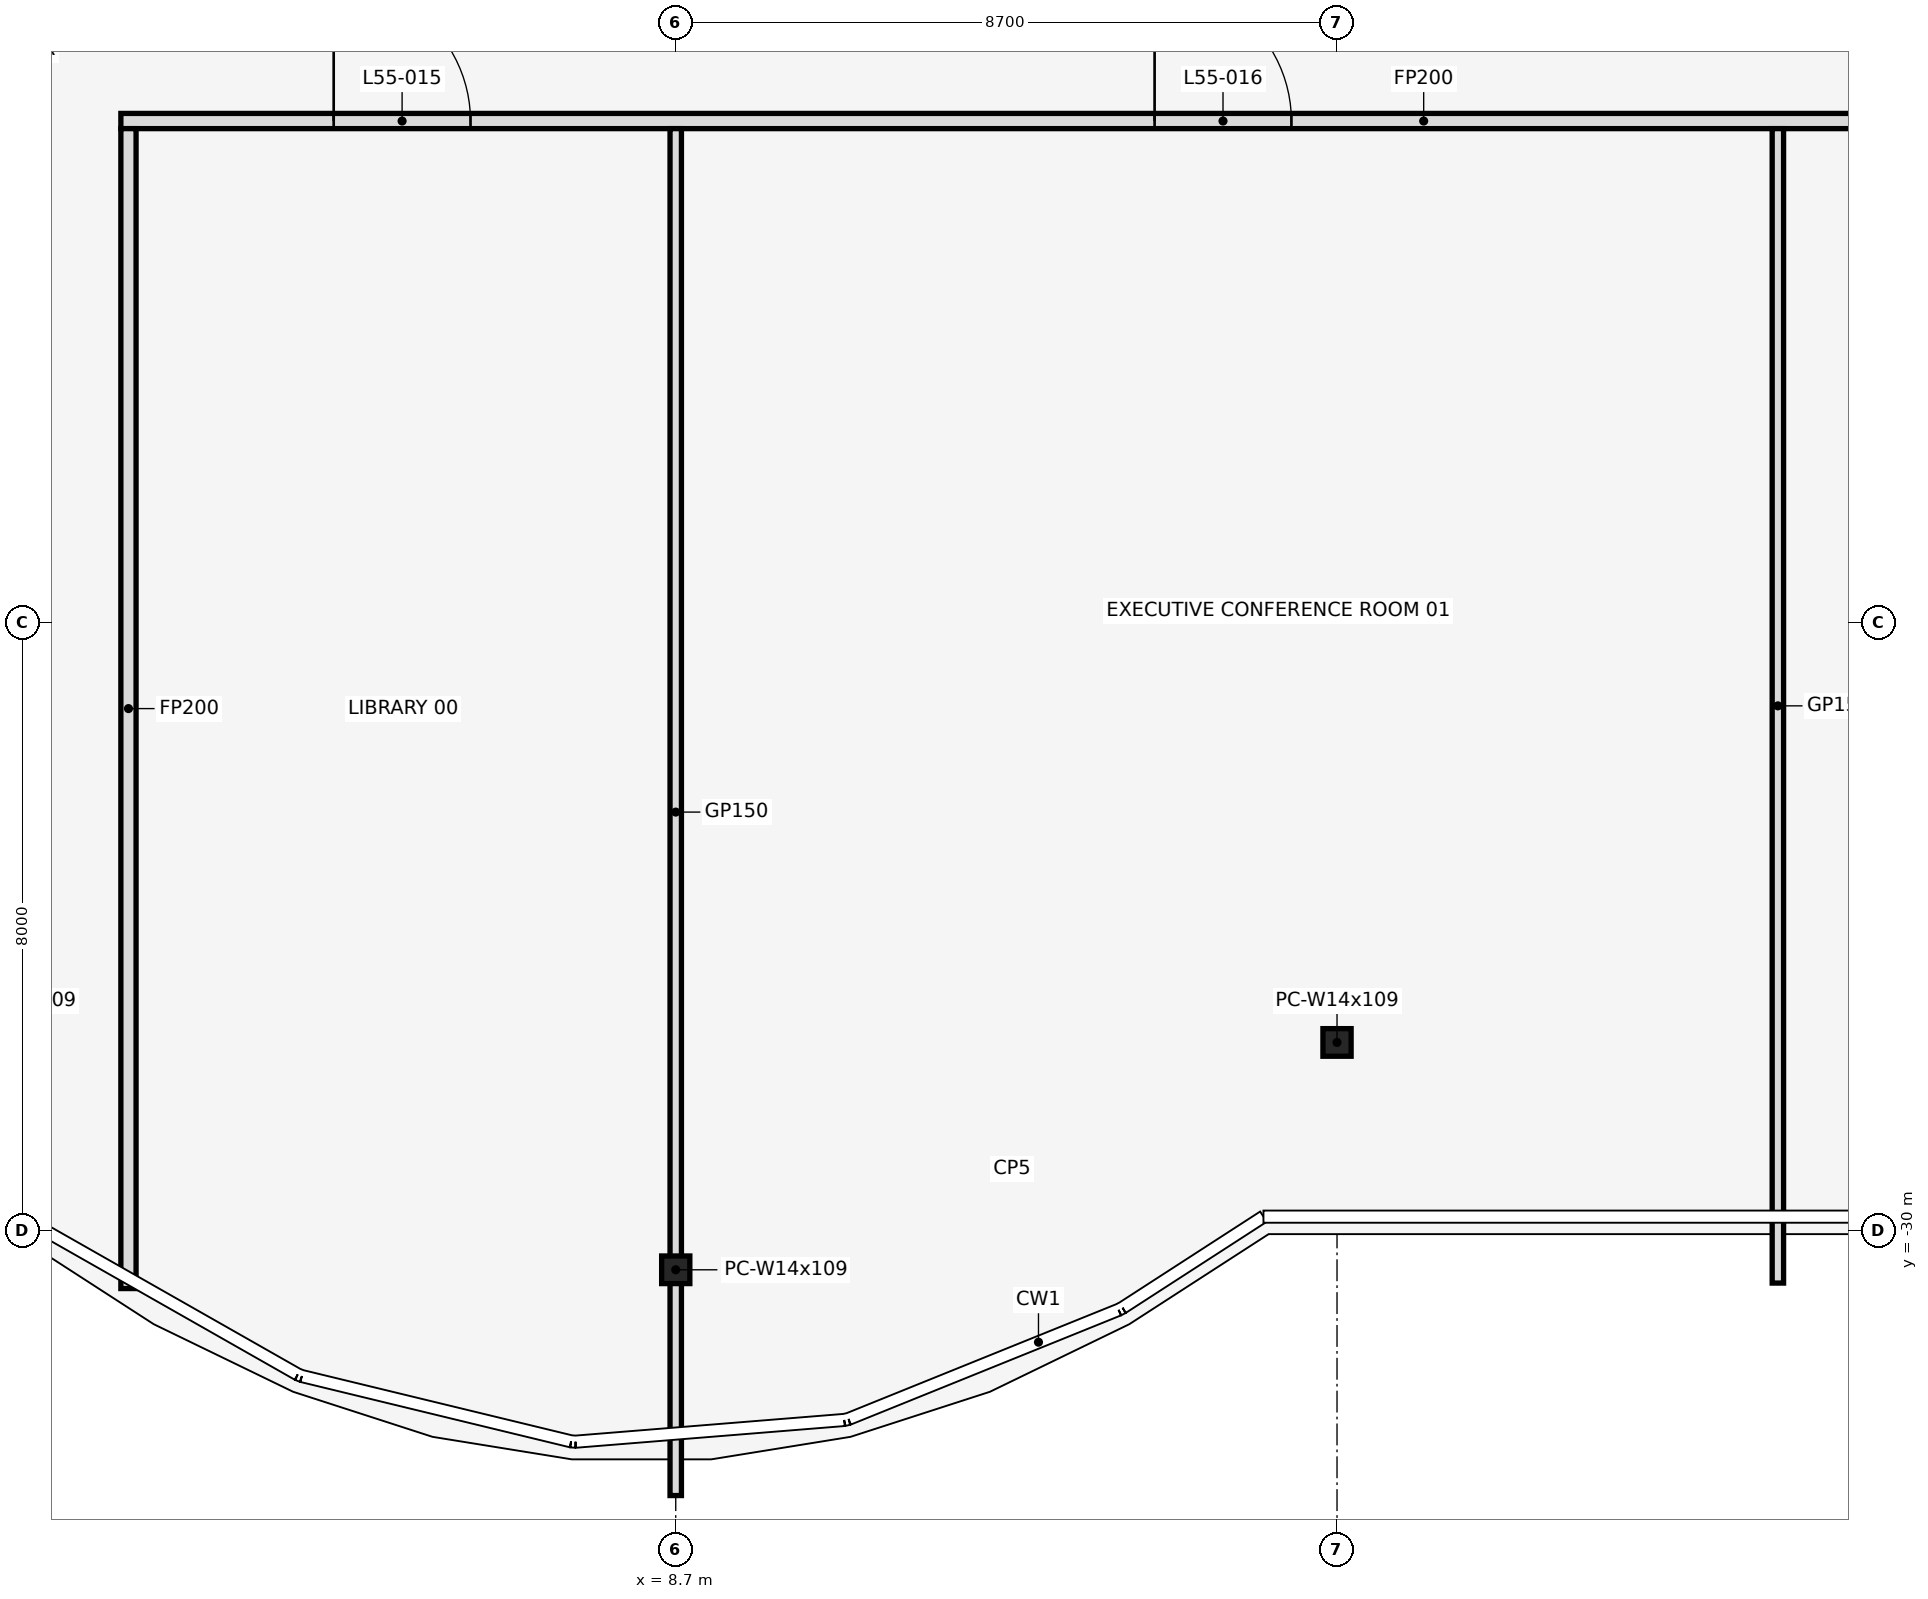
"""IFC4 building model, lengths in metres.
Left out: names, types, materials, properties, quantities, classifications, styles, units other than length and angle.
Written with IfcOpenShell. Run it as: python <this file> out.ifc"""

import sys

from ifc_helpers import new_model, si_unit, direction, frame, frame_2d, origin, origin_2d, place, context, subcontext, project, spatial, rectangle, i_section, extrude, element, fill, save


model = new_model("IFC4")
c1 = context("Model", 3, precision=1e-05, world=origin(), true_north=direction((0.0, 1.0)))
c2 = subcontext(c1, "Body", "Model", "MODEL_VIEW")
j1 = project(units=[si_unit("LENGTHUNIT", "METRE"), si_unit("PLANEANGLEUNIT", "RADIAN")], contexts=[c1])
p1 = place(None, origin())
s1 = spatial("IfcSite", under=j1, at=p1, CompositionType="ELEMENT")
p2 = place(p1, origin())
s2 = spatial("IfcBuilding", under=s1, at=p2, CompositionType="ELEMENT")
p3 = place(p2, frame((0.0, 0.0, 245.6)))
s3 = spatial("IfcBuildingStorey", under=s2, at=p3, CompositionType="ELEMENT", Elevation=245.6)
for number, where, z_axis, x_axis in (
    (1, (8.7, -30.513, 0.0), (0.0, 0.0, 1.0), (1.0, 0.0, 0.0)),
    (2, (17.4, -27.522, 0.0), (0.0, 0.0, 1.0), (1.0, 0.0, 0.0)),
):
    element("IfcColumn", number, at=place(p3, frame(where, z_axis=z_axis, x_axis=x_axis)), inside=s3, PredefinedType="COLUMN", context=c2, shape_type="SweptSolid", body=[
        extrude(i_section(OverallWidth=0.371, OverallDepth=0.363, WebThickness=0.013, FlangeThickness=0.022, at=origin_2d()), origin(), (0.0, 0.0, 1.0), 4.2),
    ])
p4 = place(p3, frame((1.4, -15.4, 0.0), z_axis=(0.0, 0.0, 1.0), x_axis=(1.0, 0.0, 0.0)))
e3 = element("IfcWall", 3, at=p4, inside=s3, PredefinedType="PARTITIONING", context=c2, shape_type="SweptSolid", body=[
    extrude(rectangle(XDim=34.28, YDim=0.2, at=frame_2d((17.14, 0.0))), origin(), (0.0, 0.0, 1.0), 3.039),
])
p5 = place(p4, frame((2.8, 0.0, 0.0)))
e4 = element("IfcOpeningElement", 4, at=p5, cuts=e3, PredefinedType="OPENING", context=c2, shape_type="SweptSolid", body=[
    extrude(rectangle(XDim=1.8, YDim=2.1, at=frame_2d((0.9, 1.05))), frame((0.0, 0.112, 0.0), z_axis=(0.0, -1.0, 0.0), x_axis=(1.0, 0.0, 0.0)), (0.0, 0.0, 1.0), 0.224),
])
p6 = place(p4, frame((13.6, 0.0, 0.0)))
e5 = element("IfcOpeningElement", 5, at=p6, cuts=e3, PredefinedType="OPENING", context=c2, shape_type="SweptSolid", body=[
    extrude(rectangle(XDim=1.8, YDim=2.1, at=frame_2d((0.9, 1.05))), frame((0.0, 0.112, 0.0), z_axis=(0.0, -1.0, 0.0), x_axis=(1.0, 0.0, 0.0)), (0.0, 0.0, 1.0), 0.224),
])
p7 = place(p4, frame((27.1, 0.0, 0.0)))
e6 = element("IfcOpeningElement", 6, at=p7, cuts=e3, PredefinedType="OPENING", context=c2, shape_type="SweptSolid", body=[
    extrude(rectangle(XDim=1.8, YDim=2.1, at=frame_2d((0.9, 1.05))), frame((0.0, 0.112, 0.0), z_axis=(0.0, -1.0, 0.0), x_axis=(1.0, 0.0, 0.0)), (0.0, 0.0, 1.0), 0.224),
])
p8 = place(p3, frame((1.5, -30.76, 0.0), z_axis=(0.0, 0.0, 1.0), x_axis=(0.0, 1.0, 0.0)))
e7 = element("IfcWall", 7, at=p8, inside=s3, PredefinedType="PARTITIONING", context=c2, shape_type="SweptSolid", body=[
    extrude(rectangle(XDim=15.26, YDim=0.2, at=frame_2d((7.63, 0.0))), origin(), (0.0, 0.0, 1.0), 3.039),
])
p9 = place(p3, frame((8.7, -33.483, 0.0), z_axis=(0.0, 0.0, 1.0), x_axis=(0.0, 1.0, 0.0)))
e8 = element("IfcWall", 8, at=p9, inside=s3, PredefinedType="PARTITIONING", context=c2, shape_type="SweptSolid", body=[
    extrude(rectangle(XDim=17.983, YDim=0.15, at=frame_2d((8.992, 0.0))), origin(), (0.0, 0.0, 1.0), 3.039),
])
p10 = place(p3, frame((23.2, -30.688, 0.0), z_axis=(0.0, 0.0, 1.0), x_axis=(0.0, 1.0, 0.0)))
e9 = element("IfcWall", 9, at=p10, inside=s3, PredefinedType="PARTITIONING", context=c2, shape_type="SweptSolid", body=[
    extrude(rectangle(XDim=15.188, YDim=0.15, at=frame_2d((7.594, 0.0))), origin(), (0.0, 0.0, 1.0), 3.039),
])
p11 = place(p5, origin())
e10 = element("IfcDoor", 10, at=p11, inside=s3, OperationType="SINGLE_SWING_LEFT", PredefinedType="DOOR", context=c2, shape_type="SweptSolid", body=[
    extrude(rectangle(XDim=1.8, YDim=2.1, at=frame_2d((0.9, 1.05))), frame((0.0, 0.025, 0.0), z_axis=(0.0, -1.0, 0.0), x_axis=(1.0, 0.0, 0.0)), (0.0, 0.0, 1.0), 0.05),
])
fill(e4, e10)
p12 = place(p6, origin())
e11 = element("IfcDoor", 11, at=p12, inside=s3, OperationType="SINGLE_SWING_LEFT", PredefinedType="DOOR", context=c2, shape_type="SweptSolid", body=[
    extrude(rectangle(XDim=1.8, YDim=2.1, at=frame_2d((0.9, 1.05))), frame((0.0, 0.025, 0.0), z_axis=(0.0, -1.0, 0.0), x_axis=(1.0, 0.0, 0.0)), (0.0, 0.0, 1.0), 0.05),
])
fill(e5, e11)
save(model, sys.argv[1])
